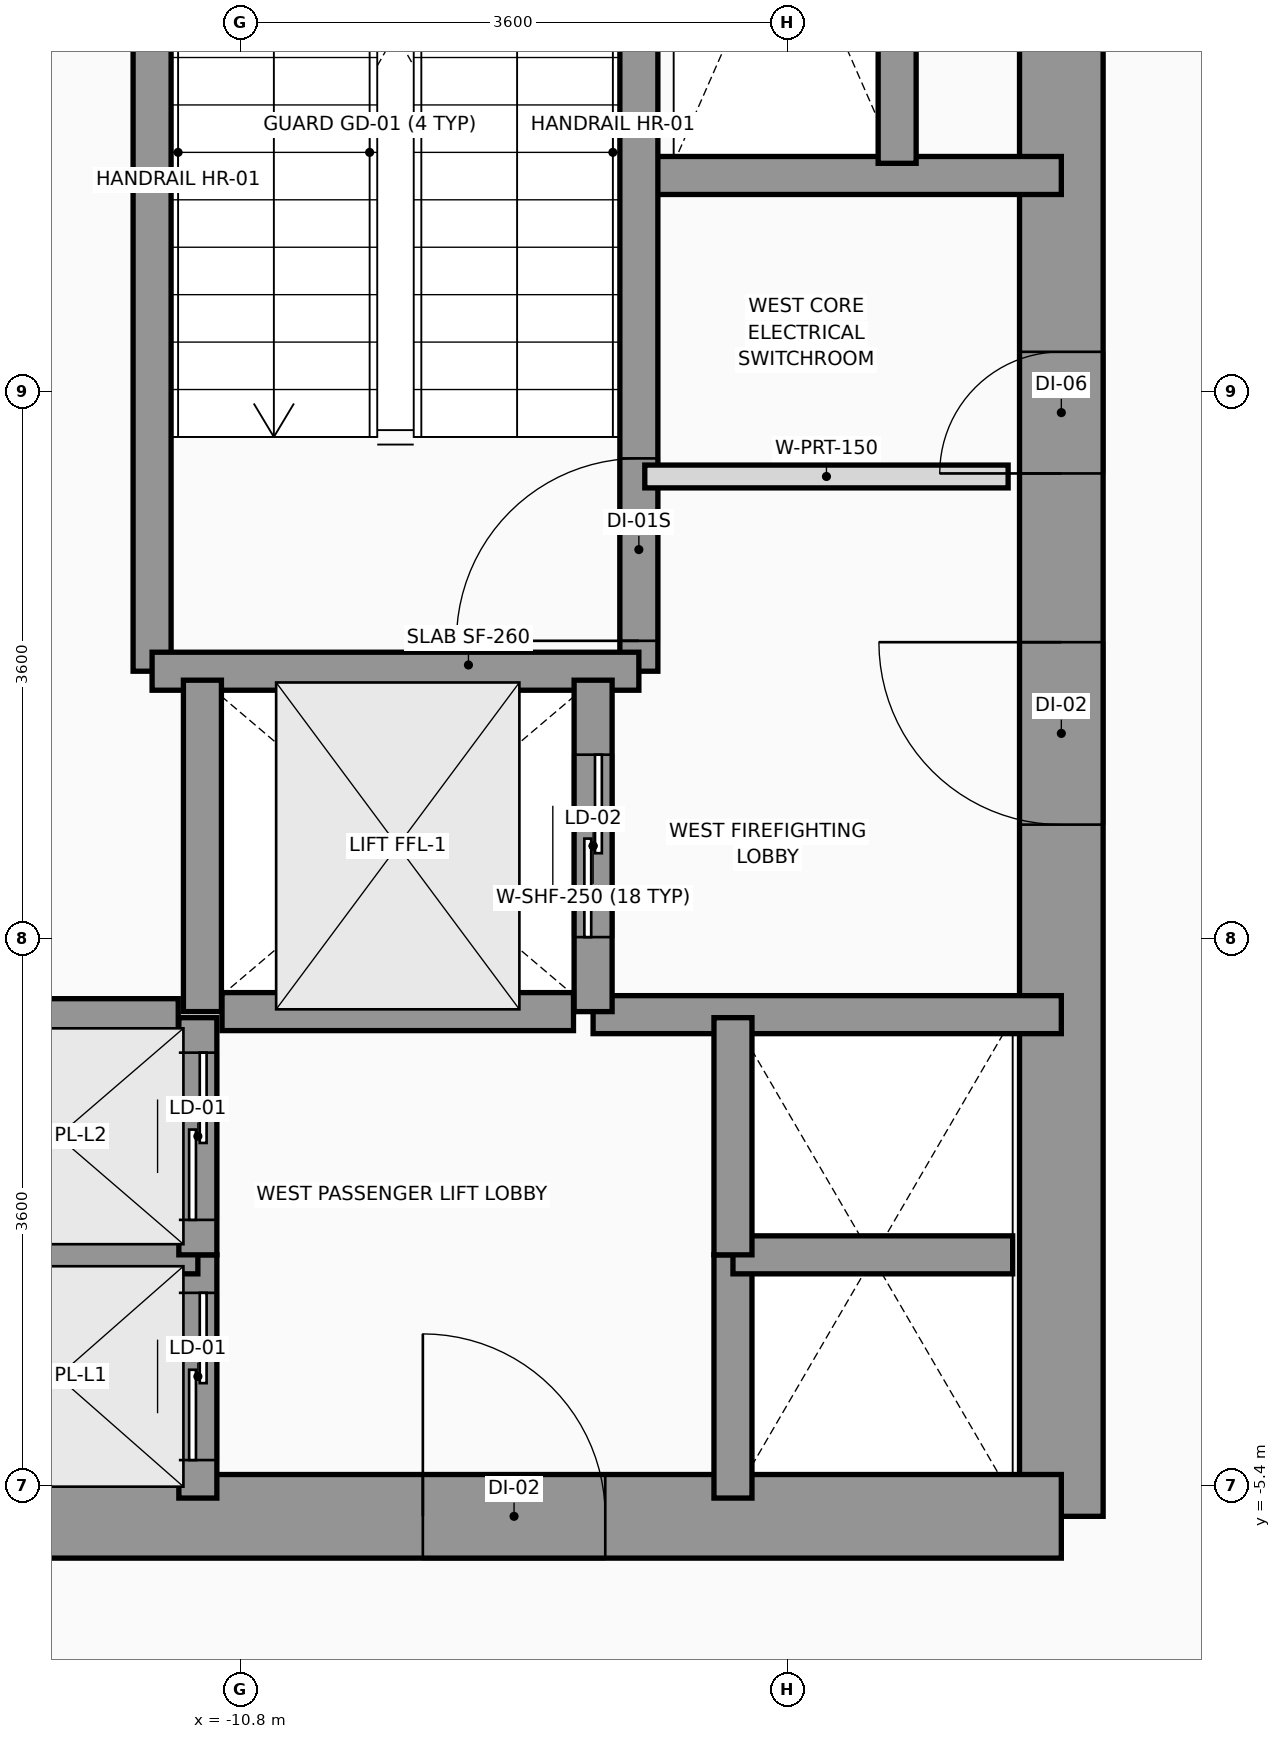
"""IFC4 building model, lengths in metres.
Left out: names, types, materials, properties, quantities, classifications, styles, units other than length and angle.
Written with IfcOpenShell. Run it as: python <this file> out.ifc"""

import sys

from ifc_helpers import new_model, si_unit, direction, frame, frame_2d, origin, place, context, subcontext, project, spatial, rectangle, extrude, source, transform, mapped, element, fill, save


model = new_model("IFC4")
c1 = context("Model", 3, precision=1e-05, world=origin(), true_north=direction((0.0, 1.0)))
c2 = subcontext(c1, "Body", "Model", "MODEL_VIEW")
j1 = project(units=[si_unit("LENGTHUNIT", "METRE"), si_unit("PLANEANGLEUNIT", "RADIAN")], contexts=[c1])
p1 = place(None, origin())
s1 = spatial("IfcSite", under=j1, at=p1, CompositionType="ELEMENT")
p2 = place(p1, origin())
s2 = spatial("IfcBuilding", under=s1, at=p2, CompositionType="ELEMENT")
p3 = place(p2, frame((0.0, 0.0, 88.4)))
s3 = spatial("IfcBuildingStorey", under=s2, at=p3, CompositionType="ELEMENT", Elevation=88.4)
p4 = place(p3, frame((-5.4, -5.6, 0.0), z_axis=(0.0, 0.0, 1.0), x_axis=(0.0, 1.0, 0.0)))
e1 = element("IfcWall", 1, at=p4, inside=s3, PredefinedType="SHEAR", context=c2, shape_type="SweptSolid", body=[
    extrude(rectangle(XDim=12.5, YDim=0.55, at=frame_2d((6.25, 0.0))), origin(), (0.0, 0.0, 1.0), 4.4),
])
p5 = place(p4, frame((4.55, 0.0, 0.0)))
e2 = element("IfcOpeningElement", 2, at=p5, cuts=e1, PredefinedType="OPENING", context=c2, shape_type="SweptSolid", body=[
    extrude(rectangle(XDim=1.2, YDim=2.2, at=frame_2d((0.6, 1.1))), frame((0.0, 0.285, 0.0), z_axis=(0.0, -1.0, 0.0), x_axis=(1.0, 0.0, 0.0)), (0.0, 0.0, 1.0), 0.57),
])
p6 = place(p4, frame((6.86, 0.0, 0.0)))
e3 = element("IfcOpeningElement", 3, at=p6, cuts=e1, PredefinedType="OPENING", context=c2, shape_type="SweptSolid", body=[
    extrude(rectangle(XDim=0.8, YDim=2.1, at=frame_2d((0.4, 1.05))), frame((0.0, 0.285, 0.0), z_axis=(0.0, -1.0, 0.0), x_axis=(1.0, 0.0, 0.0)), (0.0, 0.0, 1.0), 0.57),
])
p7 = place(p3, frame((-13.2, -5.6, 0.0), z_axis=(0.0, 0.0, 1.0), x_axis=(1.0, 0.0, 0.0)))
e4 = element("IfcWall", 4, at=p7, inside=s3, PredefinedType="SHEAR", context=c2, shape_type="SweptSolid", body=[
    extrude(rectangle(XDim=7.8, YDim=0.55, at=frame_2d((3.9, 0.0))), origin(), (0.0, 0.0, 1.0), 4.4),
])
p8 = place(p7, frame((3.6, 0.0, 0.0)))
e5 = element("IfcOpeningElement", 5, at=p8, cuts=e4, PredefinedType="OPENING", context=c2, shape_type="SweptSolid", body=[
    extrude(rectangle(XDim=1.2, YDim=2.2, at=frame_2d((0.6, 1.1))), frame((0.0, 0.285, 0.0), z_axis=(0.0, -1.0, 0.0), x_axis=(1.0, 0.0, 0.0)), (0.0, 0.0, 1.0), 0.57),
])
p9 = place(p3, frame((-8.18, 3.22, 0.0), z_axis=(0.0, 0.0, 1.0), x_axis=(1.0, 0.0, 0.0)))
e6 = element("IfcWall", 6, at=p9, inside=s3, PredefinedType="SOLIDWALL", context=c2, shape_type="SweptSolid", body=[
    extrude(rectangle(XDim=2.78, YDim=0.25, at=frame_2d((1.39, 0.0))), origin(), (0.0, 0.0, 1.0), 4.4),
])
p10 = place(p3, frame((-8.48, -2.3, 0.0), z_axis=(0.0, 0.0, 1.0), x_axis=(1.0, 0.0, 0.0)))
e7 = element("IfcWall", 7, at=p10, inside=s3, PredefinedType="SOLIDWALL", context=c2, shape_type="SweptSolid", body=[
    extrude(rectangle(XDim=3.08, YDim=0.25, at=frame_2d((1.54, 0.0))), origin(), (0.0, 0.0, 1.0), 4.4),
])
p11 = place(p3, frame((-8.179, -0.041, 0.0), z_axis=(0.0, 0.0, 1.0), x_axis=(0.0, 1.0, 0.0)))
e8 = element("IfcWall", 8, at=p11, inside=s3, PredefinedType="SOLIDWALL", context=c2, shape_type="SweptSolid", body=[
    extrude(rectangle(XDim=6.941, YDim=0.25, at=frame_2d((3.47, 0.0))), origin(), (0.0, 0.0, 1.0), 4.4),
])
p12 = place(p11, frame((0.2, 0.0, 0.0)))
e9 = element("IfcOpeningElement", 9, at=p12, cuts=e8, PredefinedType="OPENING", context=c2, shape_type="SweptSolid", body=[
    extrude(rectangle(XDim=1.2, YDim=2.2, at=frame_2d((0.6, 1.1))), frame((0.0, 0.135, 0.0), z_axis=(0.0, -1.0, 0.0), x_axis=(1.0, 0.0, 0.0)), (0.0, 0.0, 1.0), 0.27),
])
p13 = place(p3, frame((-11.381, -0.041, 0.0), z_axis=(0.0, 0.0, 1.0), x_axis=(0.0, 1.0, 0.0)))
e10 = element("IfcWall", 10, at=p13, inside=s3, PredefinedType="SOLIDWALL", context=c2, shape_type="SweptSolid", body=[
    extrude(rectangle(XDim=6.941, YDim=0.25, at=frame_2d((3.47, 0.0))), origin(), (0.0, 0.0, 1.0), 4.4),
])
p14 = place(p3, frame((-11.381, -0.041, 0.0), z_axis=(0.0, 0.0, 1.0), x_axis=(1.0, 0.0, 0.0)))
e11 = element("IfcWall", 11, at=p14, inside=s3, PredefinedType="SOLIDWALL", context=c2, shape_type="SweptSolid", body=[
    extrude(rectangle(XDim=3.202, YDim=0.25, at=frame_2d((1.601, 0.0))), origin(), (0.0, 0.0, 1.0), 4.4),
])
p15 = place(p3, frame((-11.05, -2.28, 0.0), z_axis=(0.0, 0.0, 1.0), x_axis=(0.0, 1.0, 0.0)))
e12 = element("IfcWall", 12, at=p15, inside=s3, PredefinedType="SOLIDWALL", context=c2, shape_type="SweptSolid", body=[
    extrude(rectangle(XDim=2.18, YDim=0.25, at=frame_2d((1.09, 0.0))), origin(), (0.0, 0.0, 1.0), 4.4),
])
p16 = place(p3, frame((-8.48, -2.28, 0.0), z_axis=(0.0, 0.0, 1.0), x_axis=(0.0, 1.0, 0.0)))
e13 = element("IfcWall", 13, at=p16, inside=s3, PredefinedType="SOLIDWALL", context=c2, shape_type="SweptSolid", body=[
    extrude(rectangle(XDim=2.18, YDim=0.25, at=frame_2d((1.09, 0.0))), origin(), (0.0, 0.0, 1.0), 4.4),
])
p17 = place(p16, frame((0.49, 0.0, 0.0)))
e14 = element("IfcOpeningElement", 14, at=p17, cuts=e13, PredefinedType="OPENING", context=c2, shape_type="SweptSolid", body=[
    extrude(rectangle(XDim=1.2, YDim=2.2, at=frame_2d((0.6, 1.1))), frame((0.0, 0.135, 0.0), z_axis=(0.0, -1.0, 0.0), x_axis=(1.0, 0.0, 0.0)), (0.0, 0.0, 1.0), 0.27),
])
p18 = place(p3, frame((-10.921, -2.28, 0.0), z_axis=(0.0, 0.0, 1.0), x_axis=(1.0, 0.0, 0.0)))
e15 = element("IfcWall", 15, at=p18, inside=s3, PredefinedType="SOLIDWALL", context=c2, shape_type="SweptSolid", body=[
    extrude(rectangle(XDim=2.312, YDim=0.25, at=frame_2d((1.156, 0.0))), origin(), (0.0, 0.0, 1.0), 4.4),
])
p19 = place(p3, frame((-11.08, -5.48, 0.0), z_axis=(0.0, 0.0, 1.0), x_axis=(0.0, 1.0, 0.0)))
e16 = element("IfcWall", 16, at=p19, inside=s3, PredefinedType="SOLIDWALL", context=c2, shape_type="SweptSolid", body=[
    extrude(rectangle(XDim=1.6, YDim=0.25, at=frame_2d((0.8, 0.0))), origin(), (0.0, 0.0, 1.0), 4.4),
])
p20 = place(p19, frame((0.25, 0.0, 0.0)))
e17 = element("IfcOpeningElement", 17, at=p20, cuts=e16, PredefinedType="OPENING", context=c2, shape_type="SweptSolid", body=[
    extrude(rectangle(XDim=1.1, YDim=2.2, at=frame_2d((0.55, 1.1))), frame((0.0, 0.135, 0.0), z_axis=(0.0, -1.0, 0.0), x_axis=(1.0, 0.0, 0.0)), (0.0, 0.0, 1.0), 0.27),
])
p21 = place(p3, frame((-12.92, -3.88, 0.0), z_axis=(0.0, 0.0, 1.0), x_axis=(1.0, 0.0, 0.0)))
e18 = element("IfcWall", 18, at=p21, inside=s3, PredefinedType="SOLIDWALL", context=c2, shape_type="SweptSolid", body=[
    extrude(rectangle(XDim=1.84, YDim=0.25, at=frame_2d((0.92, 0.0))), origin(), (0.0, 0.0, 1.0), 4.4),
])
p22 = place(p3, frame((-11.08, -3.88, 0.0), z_axis=(0.0, 0.0, 1.0), x_axis=(0.0, 1.0, 0.0)))
e19 = element("IfcWall", 19, at=p22, inside=s3, PredefinedType="SOLIDWALL", context=c2, shape_type="SweptSolid", body=[
    extrude(rectangle(XDim=1.56, YDim=0.25, at=frame_2d((0.78, 0.0))), origin(), (0.0, 0.0, 1.0), 4.4),
])
p23 = place(p22, frame((0.23, 0.0, 0.0)))
e20 = element("IfcOpeningElement", 20, at=p23, cuts=e19, PredefinedType="OPENING", context=c2, shape_type="SweptSolid", body=[
    extrude(rectangle(XDim=1.1, YDim=2.2, at=frame_2d((0.55, 1.1))), frame((0.0, 0.135, 0.0), z_axis=(0.0, -1.0, 0.0), x_axis=(1.0, 0.0, 0.0)), (0.0, 0.0, 1.0), 0.27),
])
p24 = place(p3, frame((-12.791, -2.32, 0.0), z_axis=(0.0, 0.0, 1.0), x_axis=(1.0, 0.0, 0.0)))
e21 = element("IfcWall", 21, at=p24, inside=s3, PredefinedType="SOLIDWALL", context=c2, shape_type="SweptSolid", body=[
    extrude(rectangle(XDim=1.582, YDim=0.25, at=frame_2d((0.791, 0.0))), origin(), (0.0, 0.0, 1.0), 4.4),
])
p25 = place(p3, frame((-7.56, -5.48, 0.0), z_axis=(0.0, 0.0, 1.0), x_axis=(0.0, 1.0, 0.0)))
e22 = element("IfcWall", 22, at=p25, inside=s3, PredefinedType="SOLIDWALL", context=c2, shape_type="SweptSolid", body=[
    extrude(rectangle(XDim=1.6, YDim=0.25, at=frame_2d((0.8, 0.0))), origin(), (0.0, 0.0, 1.0), 4.4),
])
p26 = place(p3, frame((-7.56, -3.88, 0.0), z_axis=(0.0, 0.0, 1.0), x_axis=(1.0, 0.0, 0.0)))
e23 = element("IfcWall", 23, at=p26, inside=s3, PredefinedType="SOLIDWALL", context=c2, shape_type="SweptSolid", body=[
    extrude(rectangle(XDim=1.84, YDim=0.25, at=frame_2d((0.92, 0.0))), origin(), (0.0, 0.0, 1.0), 4.4),
])
p27 = place(p3, frame((-7.56, -3.88, 0.0), z_axis=(0.0, 0.0, 1.0), x_axis=(0.0, 1.0, 0.0)))
e24 = element("IfcWall", 24, at=p27, inside=s3, PredefinedType="SOLIDWALL", context=c2, shape_type="SweptSolid", body=[
    extrude(rectangle(XDim=1.56, YDim=0.25, at=frame_2d((0.78, 0.0))), origin(), (0.0, 0.0, 1.0), 4.4),
])
p28 = place(p3, frame((-6.48, 3.3, 0.0), z_axis=(0.0, 0.0, 1.0), x_axis=(0.0, 1.0, 0.0)))
e25 = element("IfcWall", 25, at=p28, inside=s3, PredefinedType="SOLIDWALL", context=c2, shape_type="SweptSolid", body=[
    extrude(rectangle(XDim=1.68, YDim=0.25, at=frame_2d((0.84, 0.0))), origin(), (0.0, 0.0, 1.0), 4.4),
])
p29 = place(p3, frame((-8.14, 1.24, 0.0), z_axis=(0.0, 0.0, 1.0), x_axis=(1.0, 0.0, 0.0)))
e26 = element("IfcWall", 26, at=p29, inside=s3, PredefinedType="PARTITIONING", context=c2, shape_type="SweptSolid", body=[
    extrude(rectangle(XDim=2.39, YDim=0.15, at=frame_2d((1.195, 0.0))), origin(), (0.0, 0.0, 1.0), 3.5),
])
m1 = source(origin(), c2, "Body", "SweptSolid", [
    extrude(rectangle(XDim=1.2, YDim=2.2, at=frame_2d((0.6, 1.1))), frame((0.0, 0.025, 0.0), z_axis=(0.0, -1.0, 0.0), x_axis=(1.0, 0.0, 0.0)), (0.0, 0.0, 1.0), 0.05),
])
p30 = place(p12, origin())
e27 = element("IfcDoor", 27, at=p30, inside=s3, OperationType="SINGLE_SWING_LEFT", PredefinedType="DOOR", context=c2, shape_type="MappedRepresentation", body=[
    mapped(m1, transform((0.0, 0.0, 0.0), x_axis=(1.0, 0.0, 0.0), y_axis=(0.0, 1.0, 0.0), z_axis=(0.0, 0.0, 1.0), scale=1.0)),
])
fill(e9, e27)
p31 = place(p5, origin())
e28 = element("IfcDoor", 28, at=p31, inside=s3, OperationType="SINGLE_SWING_RIGHT", PredefinedType="DOOR", context=c2, shape_type="MappedRepresentation", body=[
    mapped(m1, transform((0.0, 0.0, 0.0), x_axis=(1.0, 0.0, 0.0), y_axis=(0.0, 1.0, 0.0), z_axis=(0.0, 0.0, 1.0), scale=1.0)),
])
fill(e2, e28)
p32 = place(p8, origin())
e29 = element("IfcDoor", 29, at=p32, inside=s3, OperationType="SINGLE_SWING_LEFT", PredefinedType="DOOR", context=c2, shape_type="MappedRepresentation", body=[
    mapped(m1, transform((0.0, 0.0, 0.0), x_axis=(1.0, 0.0, 0.0), y_axis=(0.0, 1.0, 0.0), z_axis=(0.0, 0.0, 1.0), scale=1.0)),
])
fill(e5, e29)
m2 = source(origin(), c2, "Body", "SweptSolid", [
    extrude(rectangle(XDim=0.8, YDim=2.1, at=frame_2d((0.4, 1.05))), frame((0.0, 0.025, 0.0), z_axis=(0.0, -1.0, 0.0), x_axis=(1.0, 0.0, 0.0)), (0.0, 0.0, 1.0), 0.05),
])
p33 = place(p6, origin())
e30 = element("IfcDoor", 30, at=p33, inside=s3, OperationType="SINGLE_SWING_LEFT", PredefinedType="DOOR", context=c2, shape_type="MappedRepresentation", body=[
    mapped(m2, transform((0.0, 0.0, 0.0), x_axis=(1.0, 0.0, 0.0), y_axis=(0.0, 1.0, 0.0), z_axis=(0.0, 0.0, 1.0), scale=1.0)),
])
fill(e3, e30)
p34 = place(p17, origin())
e31 = element("IfcDoor", 31, at=p34, inside=s3, OperationType="SLIDING_TO_RIGHT", PredefinedType="DOOR", context=c2, shape_type="MappedRepresentation", body=[
    mapped(m1, transform((0.0, 0.0, 0.0), x_axis=(1.0, 0.0, 0.0), y_axis=(0.0, 1.0, 0.0), z_axis=(0.0, 0.0, 1.0), scale=1.0)),
])
fill(e14, e31)
m3 = source(origin(), c2, "Body", "SweptSolid", [
    extrude(rectangle(XDim=1.1, YDim=2.2, at=frame_2d((0.55, 1.1))), frame((0.0, 0.025, 0.0), z_axis=(0.0, -1.0, 0.0), x_axis=(1.0, 0.0, 0.0)), (0.0, 0.0, 1.0), 0.05),
])
p35 = place(p20, origin())
e32 = element("IfcDoor", 32, at=p35, inside=s3, OperationType="SLIDING_TO_LEFT", PredefinedType="DOOR", context=c2, shape_type="MappedRepresentation", body=[
    mapped(m3, transform((0.0, 0.0, 0.0), x_axis=(1.0, 0.0, 0.0), y_axis=(0.0, 1.0, 0.0), z_axis=(0.0, 0.0, 1.0), scale=1.0)),
])
fill(e17, e32)
p36 = place(p23, origin())
e33 = element("IfcDoor", 33, at=p36, inside=s3, OperationType="SLIDING_TO_LEFT", PredefinedType="DOOR", context=c2, shape_type="MappedRepresentation", body=[
    mapped(m3, transform((0.0, 0.0, 0.0), x_axis=(1.0, 0.0, 0.0), y_axis=(0.0, 1.0, 0.0), z_axis=(0.0, 0.0, 1.0), scale=1.0)),
])
fill(e20, e33)
save(model, sys.argv[1])
